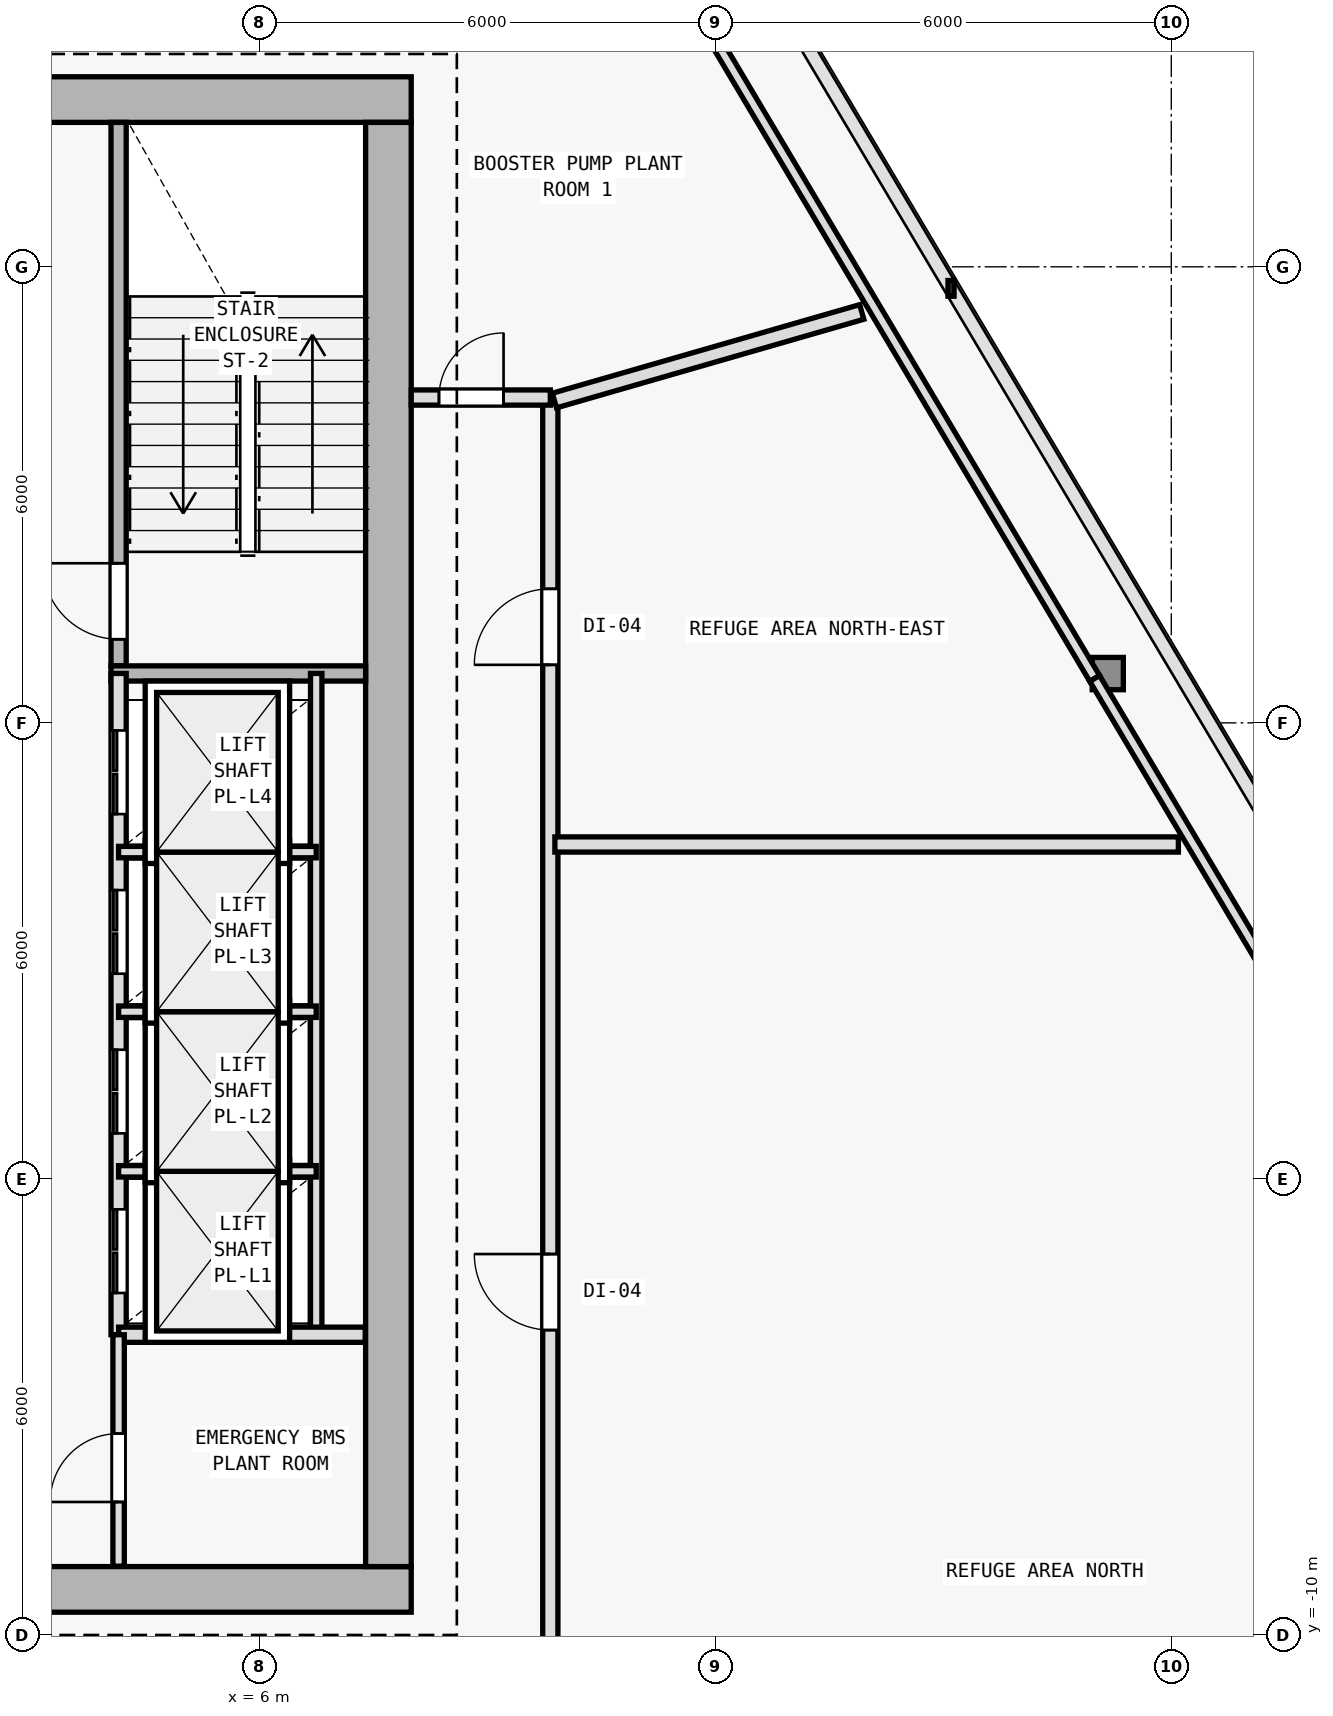
"""IFC4 building model, lengths in metres.
Left out: names, types, materials, properties, quantities, classifications, styles, units other than length and angle.
Written with IfcOpenShell. Run it as: python <this file> out.ifc"""

import sys

from ifc_helpers import new_model, si_unit, direction, frame, frame_2d, origin, origin_2d, place, context, subcontext, project, spatial, rectangle, i_section, extrude, element, fill, save


model = new_model("IFC4")
c1 = context("Model", 3, precision=1e-05, world=origin(), true_north=direction((0.0, 1.0)))
c2 = subcontext(c1, "Body", "Model", "MODEL_VIEW")
j1 = project(units=[si_unit("LENGTHUNIT", "METRE"), si_unit("PLANEANGLEUNIT", "RADIAN")], contexts=[c1])
p1 = place(None, origin())
s1 = spatial("IfcSite", under=j1, at=p1, CompositionType="ELEMENT")
p2 = place(p1, origin())
s2 = spatial("IfcBuilding", under=s1, at=p2, CompositionType="ELEMENT")
p3 = place(p2, frame((0.0, 0.0, 73.2)))
s3 = spatial("IfcBuildingStorey", under=s2, at=p3, CompositionType="ELEMENT", Elevation=73.2)
for number, where, z_axis, x_axis in (
    (1, (7.7, -9.4, 0.0), (0.0, 0.0, 1.0), (1.0, 0.0, 0.0)),
    (2, (7.7, 10.2, 0.0), (0.0, 0.0, 1.0), (1.0, 0.0, 0.0)),
    (3, (7.7, 0.4, 0.0), (0.0, 0.0, 1.0), (1.0, 0.0, 0.0)),
):
    element("IfcColumn", number, at=place(p3, frame(where, z_axis=z_axis, x_axis=x_axis)), inside=s3, PredefinedType="COLUMN", context=c2, shape_type="SweptSolid", body=[
        extrude(i_section(OverallWidth=0.416, OverallDepth=0.446, WebThickness=0.025, FlangeThickness=0.04, FilletRadius=0.015, at=origin_2d()), origin(), (0.0, 0.0, 1.0), 4.8),
    ])
p4 = place(p3, frame((17.165, 2.649, 0.006), z_axis=(-0.014629699339, 0.007340336951, 0.999866036702), x_axis=(-0.448458880867, -0.893803463951, 0.0)))
e4 = element("IfcColumn", 4, at=p4, inside=s3, PredefinedType="COLUMN", context=c2, shape_type="SweptSolid", body=[
    extrude(i_section(OverallWidth=0.409, OverallDepth=0.425, WebThickness=0.021, FlangeThickness=0.034, FilletRadius=0.015, at=origin_2d()), origin(), (0.0, 0.0, 1.0), 4.79),
])
p5 = place(p3, frame((-8.0, -9.4, 0.0), z_axis=(0.0, 0.0, 1.0), x_axis=(1.0, 0.0, 0.0)))
e5 = element("IfcWall", 5, at=p5, inside=s3, PredefinedType="SHEAR", context=c2, shape_type="SweptSolid", body=[
    extrude(rectangle(XDim=16.0, YDim=0.6, at=frame_2d((8.0, 0.0))), origin(), (0.0, 0.0, 1.0), 4.5),
])
p6 = place(p5, frame((9.65, 0.0, 0.0)))
e6 = element("IfcOpeningElement", 6, at=p6, cuts=e5, PredefinedType="OPENING", context=c2, shape_type="SweptSolid", body=[
    extrude(rectangle(XDim=1.5, YDim=2.2, at=frame_2d((0.75, 1.1))), frame((0.0, 0.31, 0.0), z_axis=(0.0, -1.0, 0.0), x_axis=(1.0, 0.0, 0.0)), (0.0, 0.0, 1.0), 0.62),
])
p7 = place(p3, frame((8.0, 10.2, 0.0), z_axis=(0.0, 0.0, 1.0), x_axis=(-1.0, 0.0, 0.0)))
e7 = element("IfcWall", 7, at=p7, inside=s3, PredefinedType="SHEAR", context=c2, shape_type="SweptSolid", body=[
    extrude(rectangle(XDim=16.0, YDim=0.6, at=frame_2d((8.0, 0.0))), origin(), (0.0, 0.0, 1.0), 4.5),
])
p8 = place(p3, frame((7.7, 9.9, 0.0), z_axis=(0.0, 0.0, 1.0), x_axis=(0.0, -1.0, 0.0)))
e8 = element("IfcWall", 8, at=p8, inside=s3, PredefinedType="SHEAR", context=c2, shape_type="SweptSolid", body=[
    extrude(rectangle(XDim=19.0, YDim=0.6, at=frame_2d((9.5, 0.0))), origin(), (0.0, 0.0, 1.0), 4.5),
])
p9 = place(p3, frame((4.15, 2.75, 0.0), z_axis=(0.0, 0.0, 1.0), x_axis=(0.0, 1.0, 0.0)))
e9 = element("IfcWall", 9, at=p9, inside=s3, PredefinedType="SOLIDWALL", context=c2, shape_type="SweptSolid", body=[
    extrude(rectangle(XDim=7.15, YDim=0.2, at=frame_2d((3.575, 0.0))), origin(), (0.0, 0.0, 1.0), 4.5),
])
p10 = place(p9, frame((0.35, 0.0, 0.0)))
e10 = element("IfcOpeningElement", 10, at=p10, cuts=e9, PredefinedType="OPENING", context=c2, shape_type="SweptSolid", body=[
    extrude(rectangle(XDim=1.0, YDim=2.15, at=frame_2d((0.5, 1.075))), frame((0.0, 0.11, 0.0), z_axis=(0.0, -1.0, 0.0), x_axis=(1.0, 0.0, 0.0)), (0.0, 0.0, 1.0), 0.22),
])
p11 = place(p3, frame((4.05, 2.65, 0.0), z_axis=(0.0, 0.0, 1.0), x_axis=(1.0, 0.0, 0.0)))
e11 = element("IfcWall", 11, at=p11, inside=s3, PredefinedType="SOLIDWALL", context=c2, shape_type="SweptSolid", body=[
    extrude(rectangle(XDim=3.35, YDim=0.2, at=frame_2d((1.675, 0.0))), origin(), (0.0, 0.0, 1.0), 4.5),
])
p12 = place(p3, frame((4.15, -6.05, 0.0), z_axis=(0.0, 0.0, 1.0), x_axis=(0.0, 1.0, 0.0)))
e12 = element("IfcWall", 12, at=p12, inside=s3, PredefinedType="SOLIDWALL", context=c2, shape_type="SweptSolid", body=[
    extrude(rectangle(XDim=8.7, YDim=0.2, at=frame_2d((4.35, 0.0))), origin(), (0.0, 0.0, 1.0), 4.5),
])
p13 = place(p12, frame((0.55, 0.0, 0.0)))
e13 = element("IfcOpeningElement", 13, at=p13, cuts=e12, PredefinedType="OPENING", context=c2, shape_type="SweptSolid", body=[
    extrude(rectangle(XDim=1.1, YDim=2.15, at=frame_2d((0.55, 1.075))), frame((0.0, 0.11, 0.0), z_axis=(0.0, -1.0, 0.0), x_axis=(1.0, 0.0, 0.0)), (0.0, 0.0, 1.0), 0.22),
])
p14 = place(p12, frame((2.65, 0.0, 0.0)))
e14 = element("IfcOpeningElement", 14, at=p14, cuts=e12, PredefinedType="OPENING", context=c2, shape_type="SweptSolid", body=[
    extrude(rectangle(XDim=1.1, YDim=2.15, at=frame_2d((0.55, 1.075))), frame((0.0, 0.11, 0.0), z_axis=(0.0, -1.0, 0.0), x_axis=(1.0, 0.0, 0.0)), (0.0, 0.0, 1.0), 0.22),
])
p15 = place(p12, frame((4.75, 0.0, 0.0)))
e15 = element("IfcOpeningElement", 15, at=p15, cuts=e12, PredefinedType="OPENING", context=c2, shape_type="SweptSolid", body=[
    extrude(rectangle(XDim=1.1, YDim=2.15, at=frame_2d((0.55, 1.075))), frame((0.0, 0.11, 0.0), z_axis=(0.0, -1.0, 0.0), x_axis=(1.0, 0.0, 0.0)), (0.0, 0.0, 1.0), 0.22),
])
p16 = place(p12, frame((6.85, 0.0, 0.0)))
e16 = element("IfcOpeningElement", 16, at=p16, cuts=e12, PredefinedType="OPENING", context=c2, shape_type="SweptSolid", body=[
    extrude(rectangle(XDim=1.1, YDim=2.15, at=frame_2d((0.55, 1.075))), frame((0.0, 0.11, 0.0), z_axis=(0.0, -1.0, 0.0), x_axis=(1.0, 0.0, 0.0)), (0.0, 0.0, 1.0), 0.22),
])
p17 = place(p3, frame((6.75, -6.05, 0.0), z_axis=(0.0, 0.0, 1.0), x_axis=(0.0, 1.0, 0.0)))
e17 = element("IfcWall", 17, at=p17, inside=s3, PredefinedType="PARTITIONING", context=c2, shape_type="SweptSolid", body=[
    extrude(rectangle(XDim=8.7, YDim=0.15, at=frame_2d((4.35, 0.0))), origin(), (0.0, 0.0, 1.0), 4.5),
])
for number, where, z_axis, x_axis in (
    (18, (4.15, -3.9, 0.0), (0.0, 0.0, 1.0), (1.0, 0.0, 0.0)),
    (19, (4.15, -1.8, 0.0), (0.0, 0.0, 1.0), (1.0, 0.0, 0.0)),
    (20, (4.15, 0.3, 0.0), (0.0, 0.0, 1.0), (1.0, 0.0, 0.0)),
):
    element("IfcWall", number, at=place(p3, frame(where, z_axis=z_axis, x_axis=x_axis)), inside=s3, PredefinedType="PARTITIONING", context=c2, shape_type="SweptSolid", body=[
        extrude(rectangle(XDim=2.6, YDim=0.15, at=frame_2d((1.3, 0.0))), origin(), (0.0, 0.0, 1.0), 4.5),
    ])
p18 = place(p3, frame((4.15, -6.05, 0.0), z_axis=(0.0, 0.0, 1.0), x_axis=(1.0, 0.0, 0.0)))
e21 = element("IfcWall", 21, at=p18, inside=s3, PredefinedType="SOLIDWALL", context=c2, shape_type="SweptSolid", body=[
    extrude(rectangle(XDim=3.245, YDim=0.2, at=frame_2d((1.623, 0.0))), origin(), (0.0, 0.0, 1.0), 4.5),
])
p19 = place(p3, frame((4.15, -9.095, 0.0), z_axis=(0.0, 0.0, 1.0), x_axis=(0.0, 1.0, 0.0)))
e22 = element("IfcWall", 22, at=p19, inside=s3, PredefinedType="PARTITIONING", context=c2, shape_type="SweptSolid", body=[
    extrude(rectangle(XDim=3.045, YDim=0.15, at=frame_2d((1.522, 0.0))), origin(), (0.0, 0.0, 1.0), 4.5),
])
p20 = place(p19, frame((0.845, 0.0, 0.0)))
e23 = element("IfcOpeningElement", 23, at=p20, cuts=e22, PredefinedType="OPENING", context=c2, shape_type="SweptSolid", body=[
    extrude(rectangle(XDim=0.9, YDim=2.1, at=frame_2d((0.45, 1.05))), frame((0.0, 0.085, 0.0), z_axis=(0.0, -1.0, 0.0), x_axis=(1.0, 0.0, 0.0)), (0.0, 0.0, 1.0), 0.17),
])
p21 = place(p3, frame((10.224, 13.967, 0.0), z_axis=(0.0, 0.0, 1.0), x_axis=(0.511094535589, -0.859524505579, 0.0)))
e24 = element("IfcWall", 24, at=p21, inside=s3, PredefinedType="PARTITIONING", context=c2, shape_type="SweptSolid", body=[
    extrude(rectangle(XDim=13.242, YDim=0.15, at=frame_2d((6.621, 0.0))), origin(), (0.0, 0.0, 1.0), 3.875),
])
p22 = place(p3, frame((16.992, 2.584, 0.0), z_axis=(0.0, 0.0, 1.0), x_axis=(0.511096364948, -0.859523417794, 0.0)))
e25 = element("IfcWall", 25, at=p22, inside=s3, PredefinedType="PARTITIONING", context=c2, shape_type="SweptSolid", body=[
    extrude(rectangle(XDim=13.25, YDim=0.15, at=frame_2d((6.625, 0.0))), origin(), (0.0, 0.0, 1.0), 3.759),
])
p23 = place(p3, frame((9.83, -11.53, 0.0), z_axis=(0.0, 0.0, 1.0), x_axis=(0.0, 1.0, 0.0)))
e26 = element("IfcWall", 26, at=p23, inside=s3, PredefinedType="SOLIDWALL", context=c2, shape_type="SweptSolid", body=[
    extrude(rectangle(XDim=17.81, YDim=0.2, at=frame_2d((8.905, 0.0))), origin(), (0.0, 0.0, 1.0), 3.759),
])
p24 = place(p23, frame((5.542, 0.0, 0.0)))
e27 = element("IfcOpeningElement", 27, at=p24, cuts=e26, PredefinedType="OPENING", context=c2, shape_type="SweptSolid", body=[
    extrude(rectangle(XDim=1.0, YDim=2.15, at=frame_2d((0.5, 1.075))), frame((0.0, 0.11, 0.0), z_axis=(0.0, -1.0, 0.0), x_axis=(1.0, 0.0, 0.0)), (0.0, 0.0, 1.0), 0.22),
])
p25 = place(p23, frame((14.293, 0.0, 0.0)))
e28 = element("IfcOpeningElement", 28, at=p25, cuts=e26, PredefinedType="OPENING", context=c2, shape_type="SweptSolid", body=[
    extrude(rectangle(XDim=1.0, YDim=2.15, at=frame_2d((0.5, 1.075))), frame((0.0, 0.11, 0.0), z_axis=(0.0, -1.0, 0.0), x_axis=(1.0, 0.0, 0.0)), (0.0, 0.0, 1.0), 0.22),
])
p26 = place(p3, frame((8.0, 6.28, 0.0), z_axis=(0.0, 0.0, 1.0), x_axis=(1.0, 0.0, 0.0)))
e29 = element("IfcWall", 29, at=p26, inside=s3, PredefinedType="SOLIDWALL", context=c2, shape_type="SweptSolid", body=[
    extrude(rectangle(XDim=1.83, YDim=0.2, at=frame_2d((0.915, 0.0))), origin(), (0.0, 0.0, 1.0), 4.5),
])
p27 = place(p26, frame((0.365, 0.0, 0.0)))
e30 = element("IfcOpeningElement", 30, at=p27, cuts=e29, PredefinedType="OPENING", context=c2, shape_type="SweptSolid", body=[
    extrude(rectangle(XDim=0.85, YDim=2.1, at=frame_2d((0.425, 1.05))), frame((0.0, 0.11, 0.0), z_axis=(0.0, -1.0, 0.0), x_axis=(1.0, 0.0, 0.0)), (0.0, 0.0, 1.0), 0.22),
])
p28 = place(p3, frame((9.89, 0.4, 0.0), z_axis=(0.0, 0.0, 1.0), x_axis=(1.0, 0.0, 0.0)))
e31 = element("IfcWall", 31, at=p28, inside=s3, PredefinedType="SOLIDWALL", context=c2, shape_type="SweptSolid", body=[
    extrude(rectangle(XDim=8.204, YDim=0.2, at=frame_2d((4.102, 0.0))), origin(), (0.0, 0.0, 1.0), 3.875),
])
p29 = place(p3, frame((9.884, 6.24, 0.0), z_axis=(0.0, 0.0, 1.0), x_axis=(0.9608975361, 0.27690418039, 0.0)))
e32 = element("IfcWall", 32, at=p29, inside=s3, PredefinedType="SOLIDWALL", context=c2, shape_type="SweptSolid", body=[
    extrude(rectangle(XDim=4.208, YDim=0.2, at=frame_2d((2.104, 0.0))), origin(), (0.0, 0.0, 1.0), 4.205),
])
p30 = place(p10, origin())
e33 = element("IfcDoor", 33, at=p30, inside=s3, OperationType="SINGLE_SWING_RIGHT", PredefinedType="DOOR", context=c2, shape_type="SweptSolid", body=[
    extrude(rectangle(XDim=1.0, YDim=2.15, at=frame_2d((0.5, 1.075))), frame((0.0, 0.025, 0.0), z_axis=(0.0, -1.0, 0.0), x_axis=(1.0, 0.0, 0.0)), (0.0, 0.0, 1.0), 0.05),
])
fill(e10, e33)
p31 = place(p13, origin())
e34 = element("IfcDoor", 34, at=p31, inside=s3, OperationType="DOUBLE_DOOR_SLIDING", PredefinedType="DOOR", context=c2, shape_type="SweptSolid", body=[
    extrude(rectangle(XDim=1.1, YDim=2.15, at=frame_2d((0.55, 1.075))), frame((0.0, 0.025, 0.0), z_axis=(0.0, -1.0, 0.0), x_axis=(1.0, 0.0, 0.0)), (0.0, 0.0, 1.0), 0.05),
])
fill(e13, e34)
p32 = place(p14, origin())
e35 = element("IfcDoor", 35, at=p32, inside=s3, OperationType="DOUBLE_DOOR_SLIDING", PredefinedType="DOOR", context=c2, shape_type="SweptSolid", body=[
    extrude(rectangle(XDim=1.1, YDim=2.15, at=frame_2d((0.55, 1.075))), frame((0.0, 0.025, 0.0), z_axis=(0.0, -1.0, 0.0), x_axis=(1.0, 0.0, 0.0)), (0.0, 0.0, 1.0), 0.05),
])
fill(e14, e35)
p33 = place(p15, origin())
e36 = element("IfcDoor", 36, at=p33, inside=s3, OperationType="DOUBLE_DOOR_SLIDING", PredefinedType="DOOR", context=c2, shape_type="SweptSolid", body=[
    extrude(rectangle(XDim=1.1, YDim=2.15, at=frame_2d((0.55, 1.075))), frame((0.0, 0.025, 0.0), z_axis=(0.0, -1.0, 0.0), x_axis=(1.0, 0.0, 0.0)), (0.0, 0.0, 1.0), 0.05),
])
fill(e15, e36)
p34 = place(p16, origin())
e37 = element("IfcDoor", 37, at=p34, inside=s3, OperationType="DOUBLE_DOOR_SLIDING", PredefinedType="DOOR", context=c2, shape_type="SweptSolid", body=[
    extrude(rectangle(XDim=1.1, YDim=2.15, at=frame_2d((0.55, 1.075))), frame((0.0, 0.025, 0.0), z_axis=(0.0, -1.0, 0.0), x_axis=(1.0, 0.0, 0.0)), (0.0, 0.0, 1.0), 0.05),
])
fill(e16, e37)
p35 = place(p20, origin())
e38 = element("IfcDoor", 38, at=p35, inside=s3, OperationType="SINGLE_SWING_LEFT", PredefinedType="DOOR", context=c2, shape_type="SweptSolid", body=[
    extrude(rectangle(XDim=0.9, YDim=2.1, at=frame_2d((0.45, 1.05))), frame((0.0, 0.025, 0.0), z_axis=(0.0, -1.0, 0.0), x_axis=(1.0, 0.0, 0.0)), (0.0, 0.0, 1.0), 0.05),
])
fill(e23, e38)
p36 = place(p24, origin())
e39 = element("IfcDoor", 39, at=p36, inside=s3, OperationType="SINGLE_SWING_RIGHT", PredefinedType="DOOR", context=c2, shape_type="SweptSolid", body=[
    extrude(rectangle(XDim=1.0, YDim=2.15, at=frame_2d((0.5, 1.075))), frame((0.0, 0.025, 0.0), z_axis=(0.0, -1.0, 0.0), x_axis=(1.0, 0.0, 0.0)), (0.0, 0.0, 1.0), 0.05),
])
fill(e27, e39)
p37 = place(p25, origin())
e40 = element("IfcDoor", 40, at=p37, inside=s3, OperationType="SINGLE_SWING_LEFT", PredefinedType="DOOR", context=c2, shape_type="SweptSolid", body=[
    extrude(rectangle(XDim=1.0, YDim=2.15, at=frame_2d((0.5, 1.075))), frame((0.0, 0.025, 0.0), z_axis=(0.0, -1.0, 0.0), x_axis=(1.0, 0.0, 0.0)), (0.0, 0.0, 1.0), 0.05),
])
fill(e28, e40)
p38 = place(p27, origin())
e41 = element("IfcDoor", 41, at=p38, inside=s3, OperationType="SINGLE_SWING_RIGHT", PredefinedType="DOOR", context=c2, shape_type="SweptSolid", body=[
    extrude(rectangle(XDim=0.85, YDim=2.1, at=frame_2d((0.425, 1.05))), frame((0.0, 0.025, 0.0), z_axis=(0.0, -1.0, 0.0), x_axis=(1.0, 0.0, 0.0)), (0.0, 0.0, 1.0), 0.05),
])
fill(e30, e41)
save(model, sys.argv[1])
